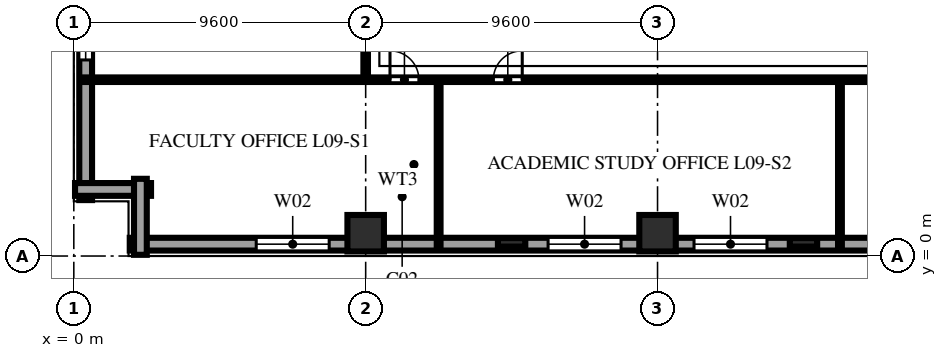
"""IFC4 building model, lengths in metres.
Left out: names, types, materials, properties, quantities, classifications, styles, units other than length and angle.
Written with IfcOpenShell. Run it as: python <this file> out.ifc"""

import sys

from ifc_helpers import new_model, si_unit, direction, frame, frame_2d, origin, origin_2d, place, context, subcontext, project, spatial, rectangle, extrude, element, fill, save


model = new_model("IFC4")
c1 = context("Model", 3, precision=1e-05, world=origin(), true_north=direction((0.0, 1.0)))
c2 = subcontext(c1, "Body", "Model", "MODEL_VIEW")
j1 = project(units=[si_unit("LENGTHUNIT", "METRE"), si_unit("PLANEANGLEUNIT", "RADIAN")], contexts=[c1])
p1 = place(None, origin())
s1 = spatial("IfcSite", under=j1, at=p1, CompositionType="ELEMENT")
p2 = place(p1, origin())
s2 = spatial("IfcBuilding", under=s1, at=p2, CompositionType="ELEMENT")
p3 = place(p2, frame((0.0, 0.0, 39.4)))
s3 = spatial("IfcBuildingStorey", under=s2, at=p3, CompositionType="ELEMENT", Elevation=39.4)
for number, where, z_axis, x_axis in (
    (1, (9.6, 0.75, 0.0), (0.0, 0.0, 1.0), (1.0, 0.0, 0.0)),
    (2, (19.2, 0.75, 0.0), (0.0, 0.0, 1.0), (1.0, 0.0, 0.0)),
):
    element("IfcColumn", number, at=place(p3, frame(where, z_axis=z_axis, x_axis=x_axis)), inside=s3, PredefinedType="COLUMN", context=c2, shape_type="SweptSolid", body=[
        extrude(rectangle(XDim=1.2, YDim=1.2, at=origin_2d()), origin(), (0.0, 0.0, 1.0), 3.8),
    ])
for number, where, z_axis, x_axis in (
    (3, (14.4, 0.45, 0.0), (0.0, 0.0, 1.0), (1.0, 0.0, 0.0)),
    (4, (24.0, 0.45, 0.0), (0.0, 0.0, 1.0), (1.0, 0.0, 0.0)),
):
    element("IfcColumn", number, at=place(p3, frame(where, z_axis=z_axis, x_axis=x_axis)), inside=s3, PredefinedType="PILASTER", context=c2, shape_type="SweptSolid", body=[
        extrude(rectangle(XDim=0.9, YDim=0.28, at=origin_2d()), origin(), (0.0, 0.0, 1.0), 3.8),
    ])
p4 = place(p3, frame((1.84, 0.39, 0.0), z_axis=(0.0, 0.0, 1.0), x_axis=(1.0, 0.0, 0.0)))
e5 = element("IfcWall", 5, at=p4, inside=s3, PredefinedType="SOLIDWALL", context=c2, shape_type="SweptSolid", body=[
    extrude(rectangle(XDim=63.52, YDim=0.42, at=frame_2d((31.76, 0.0))), origin(), (0.0, 0.0, 1.0), 3.54),
])
p5 = place(p4, frame((4.16, 0.0, 0.85)))
e6 = element("IfcOpeningElement", 6, at=p5, cuts=e5, PredefinedType="OPENING", context=c2, shape_type="SweptSolid", body=[
    extrude(rectangle(XDim=2.4, YDim=1.85, at=frame_2d((1.2, 0.925))), frame((0.0, 0.222, 0.0), z_axis=(0.0, -1.0, 0.0), x_axis=(1.0, 0.0, 0.0)), (0.0, 0.0, 1.0), 0.444),
])
p6 = place(p4, frame((13.76, 0.0, 0.85)))
e7 = element("IfcOpeningElement", 7, at=p6, cuts=e5, PredefinedType="OPENING", context=c2, shape_type="SweptSolid", body=[
    extrude(rectangle(XDim=2.4, YDim=1.85, at=frame_2d((1.2, 0.925))), frame((0.0, 0.222, 0.0), z_axis=(0.0, -1.0, 0.0), x_axis=(1.0, 0.0, 0.0)), (0.0, 0.0, 1.0), 0.444),
])
p7 = place(p4, frame((18.56, 0.0, 0.85)))
e8 = element("IfcOpeningElement", 8, at=p7, cuts=e5, PredefinedType="OPENING", context=c2, shape_type="SweptSolid", body=[
    extrude(rectangle(XDim=2.4, YDim=1.85, at=frame_2d((1.2, 0.925))), frame((0.0, 0.222, 0.0), z_axis=(0.0, -1.0, 0.0), x_axis=(1.0, 0.0, 0.0)), (0.0, 0.0, 1.0), 0.444),
])
p8 = place(p4, frame((28.16, 0.0, 0.85)))
e9 = element("IfcOpeningElement", 9, at=p8, cuts=e5, PredefinedType="OPENING", context=c2, shape_type="SweptSolid", body=[
    extrude(rectangle(XDim=2.4, YDim=1.85, at=frame_2d((1.2, 0.925))), frame((0.0, 0.222, 0.0), z_axis=(0.0, -1.0, 0.0), x_axis=(1.0, 0.0, 0.0)), (0.0, 0.0, 1.0), 0.444),
])
p9 = place(p3, frame((0.39, 65.36, 0.0), z_axis=(0.0, 0.0, 1.0), x_axis=(0.0, -1.0, 0.0)))
e10 = element("IfcWall", 10, at=p9, inside=s3, PredefinedType="SOLIDWALL", context=c2, shape_type="SweptSolid", body=[
    extrude(rectangle(XDim=63.52, YDim=0.42, at=frame_2d((31.76, 0.0))), origin(), (0.0, 0.0, 1.0), 3.54),
])
p10 = place(p9, frame((4.885, 0.0, 0.9)))
e11 = element("IfcOpeningElement", 11, at=p10, cuts=e10, PredefinedType="OPENING", context=c2, shape_type="SweptSolid", body=[
    extrude(rectangle(XDim=0.95, YDim=1.85, at=frame_2d((0.475, 0.925))), frame((0.0, 0.222, 0.0), z_axis=(0.0, -1.0, 0.0), x_axis=(1.0, 0.0, 0.0)), (0.0, 0.0, 1.0), 0.444),
])
p11 = place(p9, frame((9.41, 0.0, 0.9)))
e12 = element("IfcOpeningElement", 12, at=p11, cuts=e10, PredefinedType="OPENING", context=c2, shape_type="SweptSolid", body=[
    extrude(rectangle(XDim=1.5, YDim=1.85, at=frame_2d((0.75, 0.925))), frame((0.0, 0.222, 0.0), z_axis=(0.0, -1.0, 0.0), x_axis=(1.0, 0.0, 0.0)), (0.0, 0.0, 1.0), 0.444),
])
p12 = place(p9, frame((14.485, 0.0, 0.9)))
e13 = element("IfcOpeningElement", 13, at=p12, cuts=e10, PredefinedType="OPENING", context=c2, shape_type="SweptSolid", body=[
    extrude(rectangle(XDim=0.95, YDim=1.85, at=frame_2d((0.475, 0.925))), frame((0.0, 0.222, 0.0), z_axis=(0.0, -1.0, 0.0), x_axis=(1.0, 0.0, 0.0)), (0.0, 0.0, 1.0), 0.444),
])
p13 = place(p9, frame((19.01, 0.0, 0.9)))
e14 = element("IfcOpeningElement", 14, at=p13, cuts=e10, PredefinedType="OPENING", context=c2, shape_type="SweptSolid", body=[
    extrude(rectangle(XDim=1.5, YDim=1.85, at=frame_2d((0.75, 0.925))), frame((0.0, 0.222, 0.0), z_axis=(0.0, -1.0, 0.0), x_axis=(1.0, 0.0, 0.0)), (0.0, 0.0, 1.0), 0.444),
])
p14 = place(p9, frame((24.085, 0.0, 0.9)))
e15 = element("IfcOpeningElement", 15, at=p14, cuts=e10, PredefinedType="OPENING", context=c2, shape_type="SweptSolid", body=[
    extrude(rectangle(XDim=0.95, YDim=1.85, at=frame_2d((0.475, 0.925))), frame((0.0, 0.222, 0.0), z_axis=(0.0, -1.0, 0.0), x_axis=(1.0, 0.0, 0.0)), (0.0, 0.0, 1.0), 0.444),
])
p15 = place(p9, frame((28.61, 0.0, 0.9)))
e16 = element("IfcOpeningElement", 16, at=p15, cuts=e10, PredefinedType="OPENING", context=c2, shape_type="SweptSolid", body=[
    extrude(rectangle(XDim=1.5, YDim=1.85, at=frame_2d((0.75, 0.925))), frame((0.0, 0.222, 0.0), z_axis=(0.0, -1.0, 0.0), x_axis=(1.0, 0.0, 0.0)), (0.0, 0.0, 1.0), 0.444),
])
p16 = place(p9, frame((33.685, 0.0, 0.9)))
e17 = element("IfcOpeningElement", 17, at=p16, cuts=e10, PredefinedType="OPENING", context=c2, shape_type="SweptSolid", body=[
    extrude(rectangle(XDim=0.95, YDim=1.85, at=frame_2d((0.475, 0.925))), frame((0.0, 0.222, 0.0), z_axis=(0.0, -1.0, 0.0), x_axis=(1.0, 0.0, 0.0)), (0.0, 0.0, 1.0), 0.444),
])
p17 = place(p9, frame((38.21, 0.0, 0.9)))
e18 = element("IfcOpeningElement", 18, at=p17, cuts=e10, PredefinedType="OPENING", context=c2, shape_type="SweptSolid", body=[
    extrude(rectangle(XDim=1.5, YDim=1.85, at=frame_2d((0.75, 0.925))), frame((0.0, 0.222, 0.0), z_axis=(0.0, -1.0, 0.0), x_axis=(1.0, 0.0, 0.0)), (0.0, 0.0, 1.0), 0.444),
])
p18 = place(p9, frame((43.285, 0.0, 0.9)))
e19 = element("IfcOpeningElement", 19, at=p18, cuts=e10, PredefinedType="OPENING", context=c2, shape_type="SweptSolid", body=[
    extrude(rectangle(XDim=0.95, YDim=1.85, at=frame_2d((0.475, 0.925))), frame((0.0, 0.222, 0.0), z_axis=(0.0, -1.0, 0.0), x_axis=(1.0, 0.0, 0.0)), (0.0, 0.0, 1.0), 0.444),
])
p19 = place(p9, frame((47.81, 0.0, 0.9)))
e20 = element("IfcOpeningElement", 20, at=p19, cuts=e10, PredefinedType="OPENING", context=c2, shape_type="SweptSolid", body=[
    extrude(rectangle(XDim=1.5, YDim=1.85, at=frame_2d((0.75, 0.925))), frame((0.0, 0.222, 0.0), z_axis=(0.0, -1.0, 0.0), x_axis=(1.0, 0.0, 0.0)), (0.0, 0.0, 1.0), 0.444),
])
p20 = place(p9, frame((52.885, 0.0, 0.9)))
e21 = element("IfcOpeningElement", 21, at=p20, cuts=e10, PredefinedType="OPENING", context=c2, shape_type="SweptSolid", body=[
    extrude(rectangle(XDim=0.95, YDim=1.85, at=frame_2d((0.475, 0.925))), frame((0.0, 0.222, 0.0), z_axis=(0.0, -1.0, 0.0), x_axis=(1.0, 0.0, 0.0)), (0.0, 0.0, 1.0), 0.444),
])
p21 = place(p9, frame((57.41, 0.0, 0.9)))
e22 = element("IfcOpeningElement", 22, at=p21, cuts=e10, PredefinedType="OPENING", context=c2, shape_type="SweptSolid", body=[
    extrude(rectangle(XDim=1.5, YDim=1.85, at=frame_2d((0.75, 0.925))), frame((0.0, 0.222, 0.0), z_axis=(0.0, -1.0, 0.0), x_axis=(1.0, 0.0, 0.0)), (0.0, 0.0, 1.0), 0.444),
])
for number, where, z_axis, x_axis in (
    (23, (0.04, 2.19, 0.0), (0.0, 0.0, 1.0), (1.0, 0.0, 0.0)),
    (24, (2.19, 2.54, 0.0), (0.0, 0.0, 1.0), (0.0, -1.0, 0.0)),
):
    element("IfcWall", number, at=place(p3, frame(where, z_axis=z_axis, x_axis=x_axis)), inside=s3, PredefinedType="SOLIDWALL", context=c2, shape_type="SweptSolid", body=[
        extrude(rectangle(XDim=2.5, YDim=0.42, at=frame_2d((1.25, 0.0))), origin(), (0.0, 0.0, 1.0), 3.54),
    ])
p22 = place(p3, frame((9.6, 5.8, 0.0), z_axis=(0.0, 0.0, 1.0), x_axis=(0.0, 1.0, 0.0)))
e25 = element("IfcWall", 25, at=p22, inside=s3, PredefinedType="PARTITIONING", context=c2, shape_type="SweptSolid", body=[
    extrude(rectangle(XDim=3.8, YDim=0.15, at=frame_2d((1.9, 0.0))), origin(), (0.0, 0.0, 1.0), 3.123),
])
for number, where, z_axis, x_axis in (
    (26, (12.0, 0.22, 0.0), (0.0, 0.0, 1.0), (0.0, 1.0, 0.0)),
    (27, (25.2, 0.22, 0.0), (0.0, 0.0, 1.0), (0.0, 1.0, 0.0)),
):
    element("IfcWall", number, at=place(p3, frame(where, z_axis=z_axis, x_axis=x_axis)), inside=s3, PredefinedType="PARTITIONING", context=c2, shape_type="SweptSolid", body=[
        extrude(rectangle(XDim=5.58, YDim=0.125, at=frame_2d((2.79, 0.0))), origin(), (0.0, 0.0, 1.0), 3.54),
    ])
p23 = place(p3, frame((0.22, 5.8, 0.0), z_axis=(0.0, 0.0, 1.0), x_axis=(1.0, 0.0, 0.0)))
e28 = element("IfcWall", 28, at=p23, inside=s3, PredefinedType="PARTITIONING", context=c2, shape_type="SweptSolid", body=[
    extrude(rectangle(XDim=52.58, YDim=0.15, at=frame_2d((26.29, 0.0))), origin(), (0.0, 0.0, 1.0), 3.54),
])
p24 = place(p23, frame((10.18, 0.0, 0.0)))
e29 = element("IfcOpeningElement", 29, at=p24, cuts=e28, PredefinedType="OPENING", context=c2, shape_type="SweptSolid", body=[
    extrude(rectangle(XDim=0.95, YDim=2.15, at=frame_2d((0.475, 1.075))), frame((0.0, 0.087, 0.0), z_axis=(0.0, -1.0, 0.0), x_axis=(1.0, 0.0, 0.0)), (0.0, 0.0, 1.0), 0.174),
])
p25 = place(p23, frame((13.58, 0.0, 0.0)))
e30 = element("IfcOpeningElement", 30, at=p25, cuts=e28, PredefinedType="OPENING", context=c2, shape_type="SweptSolid", body=[
    extrude(rectangle(XDim=0.95, YDim=2.15, at=frame_2d((0.475, 1.075))), frame((0.0, 0.087, 0.0), z_axis=(0.0, -1.0, 0.0), x_axis=(1.0, 0.0, 0.0)), (0.0, 0.0, 1.0), 0.174),
])
p26 = place(p23, frame((32.53, 0.0, 0.0)))
e31 = element("IfcOpeningElement", 31, at=p26, cuts=e28, PredefinedType="OPENING", context=c2, shape_type="SweptSolid", body=[
    extrude(rectangle(XDim=0.95, YDim=2.15, at=frame_2d((0.475, 1.075))), frame((0.0, 0.087, 0.0), z_axis=(0.0, -1.0, 0.0), x_axis=(1.0, 0.0, 0.0)), (0.0, 0.0, 1.0), 0.174),
])
p27 = place(p23, frame((41.63, 0.0, 0.0)))
e32 = element("IfcOpeningElement", 32, at=p27, cuts=e28, PredefinedType="OPENING", context=c2, shape_type="SweptSolid", body=[
    extrude(rectangle(XDim=0.95, YDim=2.15, at=frame_2d((0.475, 1.075))), frame((0.0, 0.087, 0.0), z_axis=(0.0, -1.0, 0.0), x_axis=(1.0, 0.0, 0.0)), (0.0, 0.0, 1.0), 0.174),
])
p28 = place(p5, origin())
e33 = element("IfcWindow", 33, at=p28, inside=s3, PartitioningType="TRIPLE_PANEL_VERTICAL", PredefinedType="WINDOW", context=c2, shape_type="SweptSolid", body=[
    extrude(rectangle(XDim=2.4, YDim=1.85, at=frame_2d((1.2, 0.925))), frame((0.0, 0.11, 0.0), z_axis=(0.0, -1.0, 0.0), x_axis=(1.0, 0.0, 0.0)), (0.0, 0.0, 1.0), 0.06),
])
fill(e6, e33)
p29 = place(p6, origin())
e34 = element("IfcWindow", 34, at=p29, inside=s3, PartitioningType="TRIPLE_PANEL_VERTICAL", PredefinedType="WINDOW", context=c2, shape_type="SweptSolid", body=[
    extrude(rectangle(XDim=2.4, YDim=1.85, at=frame_2d((1.2, 0.925))), frame((0.0, 0.11, 0.0), z_axis=(0.0, -1.0, 0.0), x_axis=(1.0, 0.0, 0.0)), (0.0, 0.0, 1.0), 0.06),
])
fill(e7, e34)
p30 = place(p7, origin())
e35 = element("IfcWindow", 35, at=p30, inside=s3, PartitioningType="TRIPLE_PANEL_VERTICAL", PredefinedType="WINDOW", context=c2, shape_type="SweptSolid", body=[
    extrude(rectangle(XDim=2.4, YDim=1.85, at=frame_2d((1.2, 0.925))), frame((0.0, 0.11, 0.0), z_axis=(0.0, -1.0, 0.0), x_axis=(1.0, 0.0, 0.0)), (0.0, 0.0, 1.0), 0.06),
])
fill(e8, e35)
p31 = place(p21, origin())
e36 = element("IfcWindow", 36, at=p31, inside=s3, PartitioningType="DOUBLE_PANEL_VERTICAL", PredefinedType="WINDOW", context=c2, shape_type="SweptSolid", body=[
    extrude(rectangle(XDim=1.5, YDim=1.85, at=frame_2d((0.75, 0.925))), frame((0.0, 0.11, 0.0), z_axis=(0.0, -1.0, 0.0), x_axis=(1.0, 0.0, 0.0)), (0.0, 0.0, 1.0), 0.06),
])
fill(e22, e36)
p32 = place(p24, origin())
e37 = element("IfcDoor", 37, at=p32, inside=s3, OperationType="SINGLE_SWING_LEFT", PredefinedType="DOOR", context=c2, shape_type="SweptSolid", body=[
    extrude(rectangle(XDim=0.95, YDim=2.15, at=frame_2d((0.475, 1.075))), frame((0.0, 0.025, 0.0), z_axis=(0.0, -1.0, 0.0), x_axis=(1.0, 0.0, 0.0)), (0.0, 0.0, 1.0), 0.05),
])
fill(e29, e37)
p33 = place(p25, origin())
e38 = element("IfcDoor", 38, at=p33, inside=s3, OperationType="SINGLE_SWING_RIGHT", PredefinedType="DOOR", context=c2, shape_type="SweptSolid", body=[
    extrude(rectangle(XDim=0.95, YDim=2.15, at=frame_2d((0.475, 1.075))), frame((0.0, 0.025, 0.0), z_axis=(0.0, -1.0, 0.0), x_axis=(1.0, 0.0, 0.0)), (0.0, 0.0, 1.0), 0.05),
])
fill(e30, e38)
save(model, sys.argv[1])
